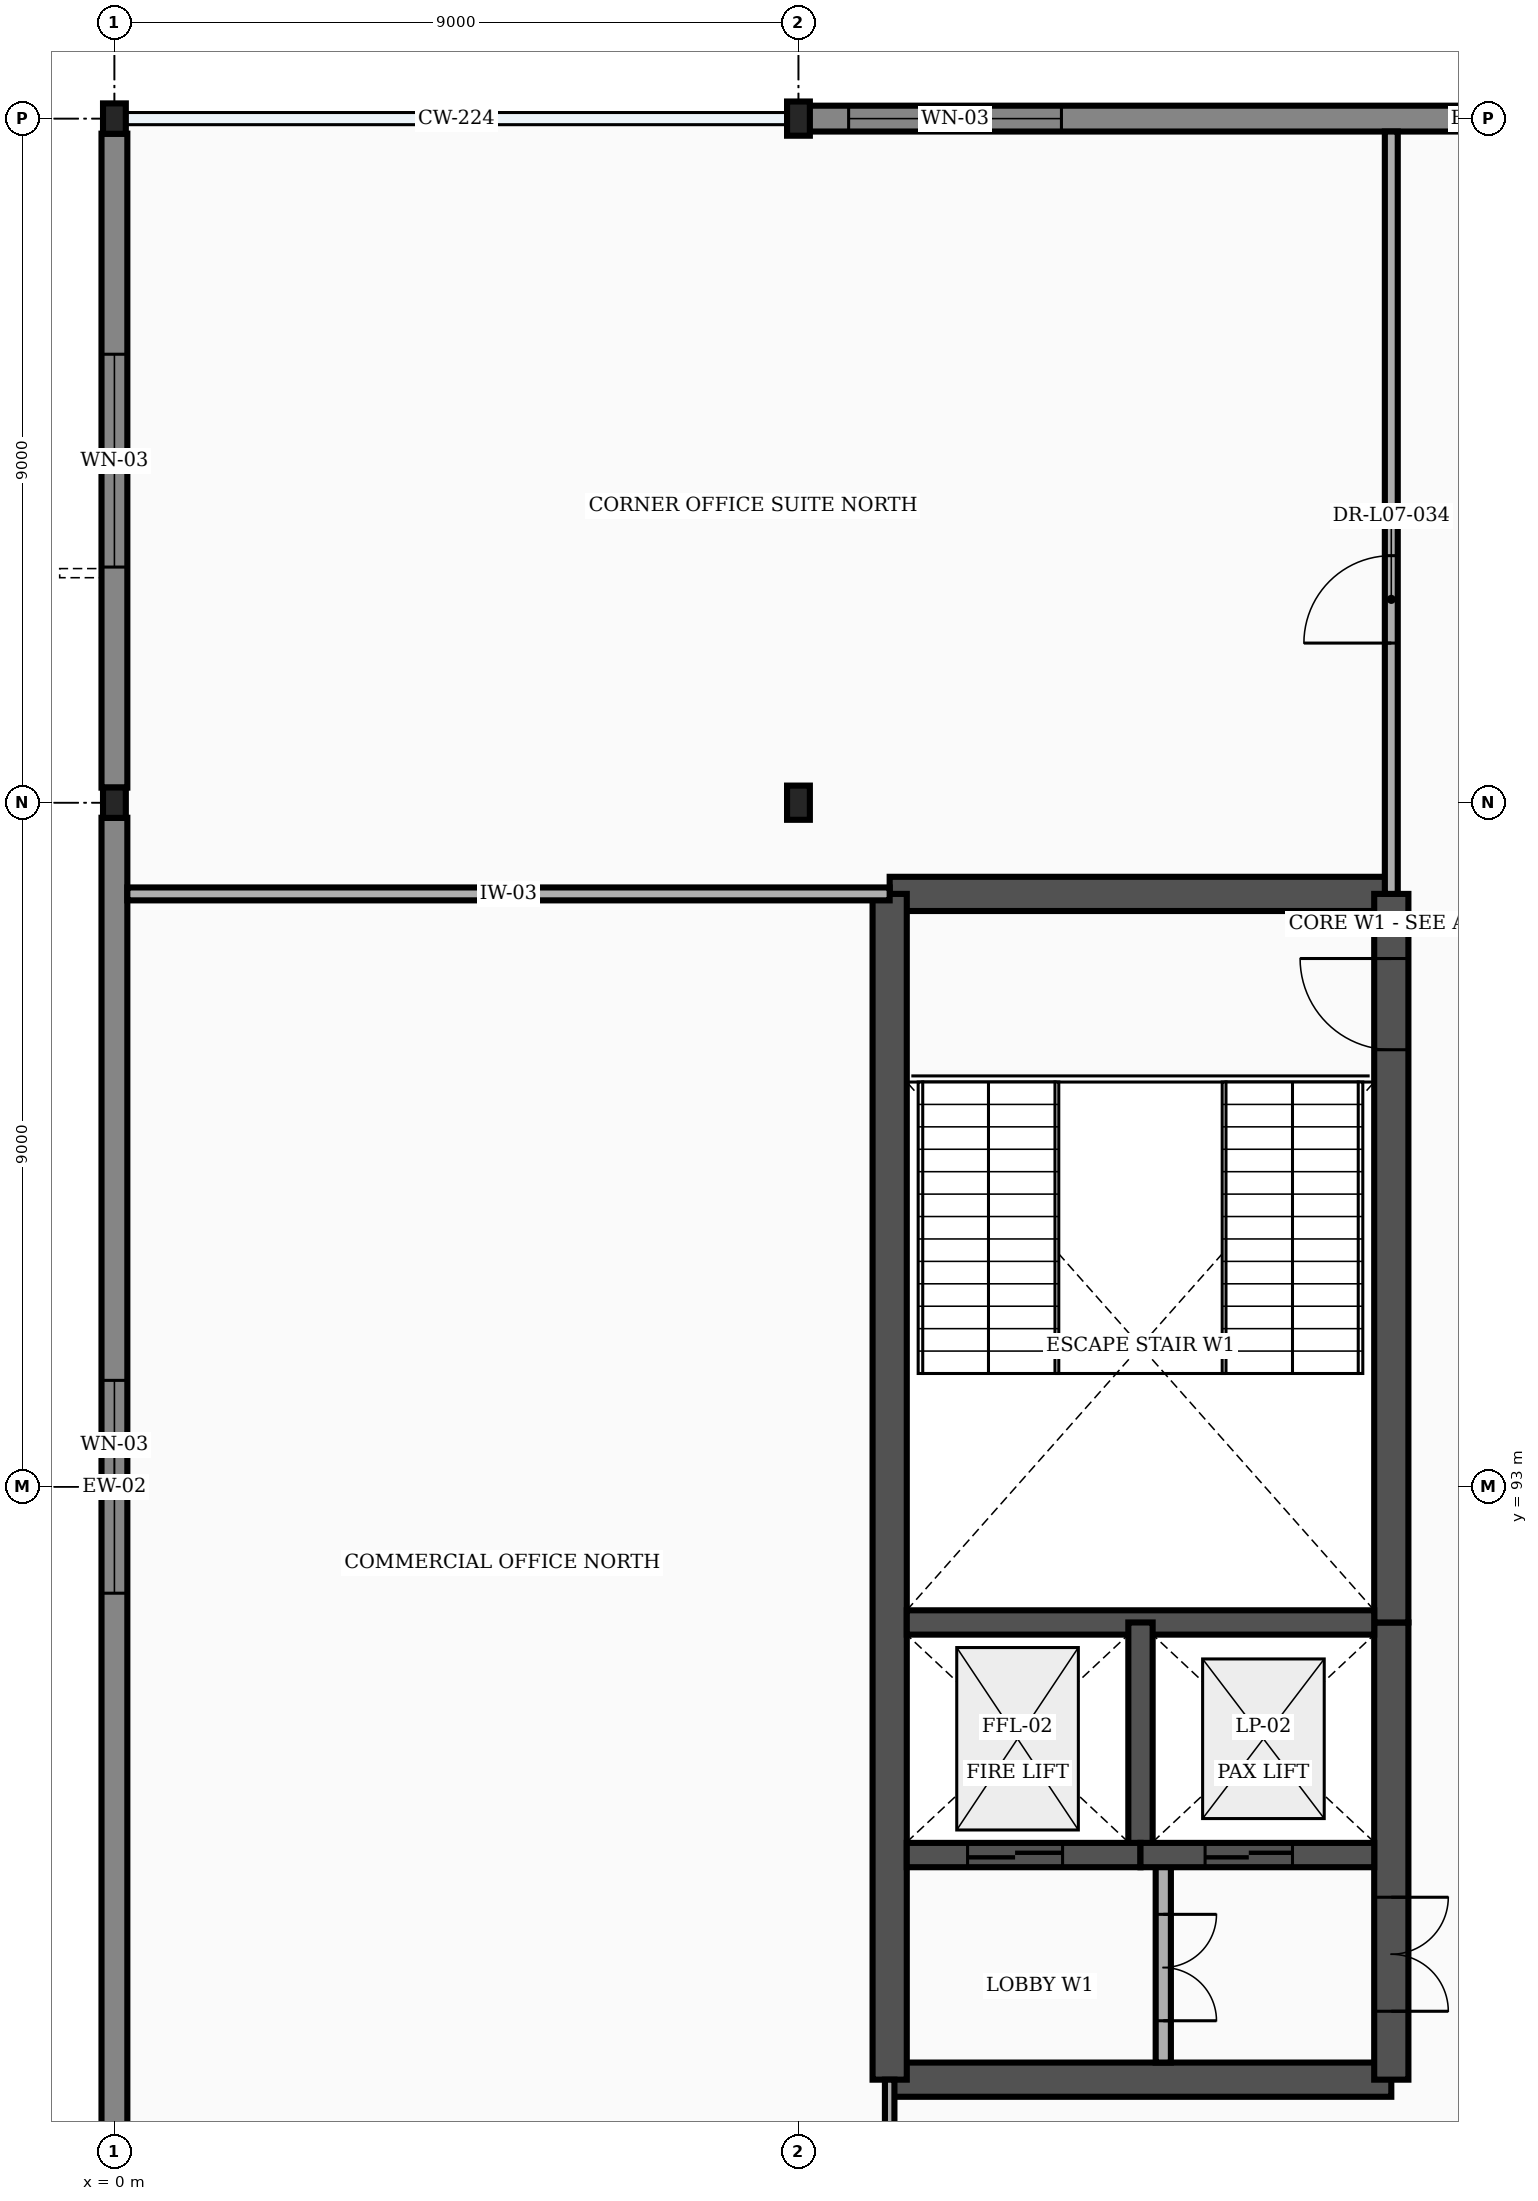
"""IFC4 building model, lengths in metres.
Left out: names, types, materials, properties, quantities, classifications, styles, units other than length and angle.
Written with IfcOpenShell. Run it as: python <this file> out.ifc"""

import sys

from ifc_helpers import new_model, si_unit, direction, frame, frame_2d, origin, origin_2d, place, context, subcontext, project, spatial, rectangle, i_section, extrude, element, fill, save


model = new_model("IFC4")
c1 = context("Model", 3, precision=1e-05, world=origin(), true_north=direction((0.0, 1.0)))
c2 = subcontext(c1, "Body", "Model", "MODEL_VIEW")
j1 = project(units=[si_unit("LENGTHUNIT", "METRE"), si_unit("PLANEANGLEUNIT", "RADIAN")], contexts=[c1])
p1 = place(None, origin())
s1 = spatial("IfcSite", under=j1, at=p1, CompositionType="ELEMENT")
p2 = place(p1, origin())
s2 = spatial("IfcBuilding", under=s1, at=p2, CompositionType="ELEMENT")
p3 = place(p2, frame((0.0, 0.0, 33.3)))
s3 = spatial("IfcBuildingStorey", under=s2, at=p3, CompositionType="ELEMENT", Elevation=33.3)
for number, where, z_axis, x_axis in (
    (1, (0.0, 102.0, 0.0), (0.0, 0.0, 1.0), (1.0, 0.0, 0.0)),
    (2, (0.0, 111.0, 0.0), (0.0, 0.0, 1.0), (1.0, 0.0, 0.0)),
):
    element("IfcColumn", number, at=place(p3, frame(where, z_axis=z_axis, x_axis=x_axis)), inside=s3, PredefinedType="COLUMN", context=c2, shape_type="SweptSolid", body=[
        extrude(i_section(OverallWidth=0.3, OverallDepth=0.4, WebThickness=0.013, FlangeThickness=0.024, FilletRadius=0.027, at=origin_2d()), origin(), (0.0, 0.0, 1.0), 4.5),
    ])
for number, where, z_axis, x_axis in (
    (3, (9.0, 102.0, 0.0), (0.0, 0.0, 1.0), (1.0, 0.0, 0.0)),
    (4, (9.0, 111.0, 0.0), (0.0, 0.0, 1.0), (1.0, 0.0, 0.0)),
):
    element("IfcColumn", number, at=place(p3, frame(where, z_axis=z_axis, x_axis=x_axis)), inside=s3, PredefinedType="COLUMN", context=c2, shape_type="SweptSolid", body=[
        extrude(i_section(OverallWidth=0.3, OverallDepth=0.45, WebThickness=0.014, FlangeThickness=0.026, FilletRadius=0.027, at=origin_2d()), origin(), (0.0, 0.0, 1.0), 4.5),
    ])
p4 = place(p3, frame((9.01, 111.0, 0.0), z_axis=(0.0, 0.0, 1.0), x_axis=(1.0, 0.0, 0.0)))
e5 = element("IfcWall", 5, at=p4, inside=s3, PredefinedType="STANDARD", context=c2, shape_type="SweptSolid", body=[
    extrude(rectangle(XDim=17.98, YDim=0.34, at=frame_2d((8.99, 0.0))), origin(), (0.0, 0.0, 1.0), 3.493),
])
p5 = place(p4, frame((0.65, 0.0, 0.85)))
e6 = element("IfcOpeningElement", 6, at=p5, cuts=e5, PredefinedType="OPENING", context=c2, shape_type="SweptSolid", body=[
    extrude(rectangle(XDim=2.8, YDim=2.25, at=frame_2d((1.4, 1.125))), frame((0.0, 0.182, 0.0), z_axis=(0.0, -1.0, 0.0), x_axis=(1.0, 0.0, 0.0)), (0.0, 0.0, 1.0), 0.364),
])
p6 = place(p3, frame((0.0, 84.198, 0.0), z_axis=(0.0, 0.0, 1.0), x_axis=(0.0, 1.0, 0.0)))
e7 = element("IfcWall", 7, at=p6, inside=s3, PredefinedType="STANDARD", context=c2, shape_type="SweptSolid", body=[
    extrude(rectangle(XDim=17.604, YDim=0.34, at=frame_2d((8.802, 0.0))), origin(), (0.0, 0.0, 1.0), 3.643),
])
p7 = place(p6, frame((7.402, 0.0, 0.85)))
e8 = element("IfcOpeningElement", 8, at=p7, cuts=e7, PredefinedType="OPENING", context=c2, shape_type="SweptSolid", body=[
    extrude(rectangle(XDim=2.8, YDim=2.25, at=frame_2d((1.4, 1.125))), frame((0.0, 0.182, 0.0), z_axis=(0.0, -1.0, 0.0), x_axis=(1.0, 0.0, 0.0)), (0.0, 0.0, 1.0), 0.364),
])
p8 = place(p3, frame((0.0, 102.198, 0.0), z_axis=(0.0, 0.0, 1.0), x_axis=(0.0, 1.0, 0.0)))
e9 = element("IfcWall", 9, at=p8, inside=s3, PredefinedType="STANDARD", context=c2, shape_type="SweptSolid", body=[
    extrude(rectangle(XDim=8.604, YDim=0.34, at=frame_2d((4.302, 0.0))), origin(), (0.0, 0.0, 1.0), 4.255),
])
p9 = place(p8, frame((2.902, 0.0, 0.85)))
e10 = element("IfcOpeningElement", 10, at=p9, cuts=e9, PredefinedType="OPENING", context=c2, shape_type="SweptSolid", body=[
    extrude(rectangle(XDim=2.8, YDim=2.25, at=frame_2d((1.4, 1.125))), frame((0.0, 0.182, 0.0), z_axis=(0.0, -1.0, 0.0), x_axis=(1.0, 0.0, 0.0)), (0.0, 0.0, 1.0), 0.364),
])
for number, where, z_axis, x_axis in (
    (11, (10.2, 85.2, 0.0), (0.0, 0.0, 1.0), (1.0, 0.0, 0.0)),
    (12, (10.2, 100.8, 0.0), (0.0, 0.0, 1.0), (1.0, 0.0, 0.0)),
):
    element("IfcWall", number, at=place(p3, frame(where, z_axis=z_axis, x_axis=x_axis)), inside=s3, PredefinedType="SHEAR", context=c2, shape_type="SweptSolid", body=[
        extrude(rectangle(XDim=6.6, YDim=0.45, at=frame_2d((3.3, 0.0))), origin(), (0.0, 0.0, 1.0), 4.255),
    ])
p10 = place(p3, frame((10.2, 85.2, 0.0), z_axis=(0.0, 0.0, 1.0), x_axis=(0.0, 1.0, 0.0)))
e13 = element("IfcWall", 13, at=p10, inside=s3, PredefinedType="SHEAR", context=c2, shape_type="SweptSolid", body=[
    extrude(rectangle(XDim=15.6, YDim=0.45, at=frame_2d((7.8, 0.0))), origin(), (0.0, 0.0, 1.0), 4.255),
])
p11 = place(p3, frame((16.8, 85.2, 0.0), z_axis=(0.0, 0.0, 1.0), x_axis=(0.0, 1.0, 0.0)))
e14 = element("IfcWall", 14, at=p11, inside=s3, PredefinedType="SHEAR", context=c2, shape_type="SweptSolid", body=[
    extrude(rectangle(XDim=6.015, YDim=0.45, at=frame_2d((3.008, 0.0))), origin(), (0.0, 0.0, 1.0), 4.255),
])
p12 = place(p11, frame((0.9, 0.0, 0.0)))
e15 = element("IfcOpeningElement", 15, at=p12, cuts=e14, PredefinedType="OPENING", context=c2, shape_type="SweptSolid", body=[
    extrude(rectangle(XDim=1.5, YDim=2.2, at=frame_2d((0.75, 1.1))), frame((0.0, 0.237, 0.0), z_axis=(0.0, -1.0, 0.0), x_axis=(1.0, 0.0, 0.0)), (0.0, 0.0, 1.0), 0.474),
])
p13 = place(p3, frame((16.8, 91.215, 0.0), z_axis=(0.0, 0.0, 1.0), x_axis=(0.0, 1.0, 0.0)))
e16 = element("IfcWall", 16, at=p13, inside=s3, PredefinedType="SHEAR", context=c2, shape_type="SweptSolid", body=[
    extrude(rectangle(XDim=9.585, YDim=0.45, at=frame_2d((4.792, 0.0))), origin(), (0.0, 0.0, 1.0), 4.255),
])
p14 = place(p13, frame((7.535, 0.0, 0.0)))
e17 = element("IfcOpeningElement", 17, at=p14, cuts=e16, PredefinedType="OPENING", context=c2, shape_type="SweptSolid", body=[
    extrude(rectangle(XDim=1.2, YDim=2.2, at=frame_2d((0.6, 1.1))), frame((0.0, 0.237, 0.0), z_axis=(0.0, -1.0, 0.0), x_axis=(1.0, 0.0, 0.0)), (0.0, 0.0, 1.0), 0.474),
])
p15 = place(p3, frame((10.425, 91.215, 0.0), z_axis=(0.0, 0.0, 1.0), x_axis=(1.0, 0.0, 0.0)))
e18 = element("IfcWall", 18, at=p15, inside=s3, PredefinedType="SHEAR", context=c2, shape_type="SweptSolid", body=[
    extrude(rectangle(XDim=6.15, YDim=0.32, at=frame_2d((3.075, 0.0))), origin(), (0.0, 0.0, 1.0), 4.255),
])
p16 = place(p3, frame((13.5, 88.155, 0.0), z_axis=(0.0, 0.0, 1.0), x_axis=(0.0, 1.0, 0.0)))
e19 = element("IfcWall", 19, at=p16, inside=s3, PredefinedType="SHEAR", context=c2, shape_type="SweptSolid", body=[
    extrude(rectangle(XDim=3.06, YDim=0.32, at=frame_2d((1.53, 0.0))), origin(), (0.0, 0.0, 1.0), 4.255),
])
p17 = place(p3, frame((13.8, 85.425, 0.0), z_axis=(0.0, 0.0, 1.0), x_axis=(0.0, 1.0, 0.0)))
e20 = element("IfcWall", 20, at=p17, inside=s3, PredefinedType="PARTITIONING", context=c2, shape_type="SweptSolid", body=[
    extrude(rectangle(XDim=2.73, YDim=0.2, at=frame_2d((1.365, 0.0))), origin(), (0.0, 0.0, 1.0), 4.255),
])
p18 = place(p17, frame((0.55, 0.0, 0.0)))
e21 = element("IfcOpeningElement", 21, at=p18, cuts=e20, PredefinedType="OPENING", context=c2, shape_type="SweptSolid", body=[
    extrude(rectangle(XDim=1.4, YDim=2.25, at=frame_2d((0.7, 1.125))), frame((0.0, 0.112, 0.0), z_axis=(0.0, -1.0, 0.0), x_axis=(1.0, 0.0, 0.0)), (0.0, 0.0, 1.0), 0.224),
])
p19 = place(p3, frame((10.425, 88.155, 0.0), z_axis=(0.0, 0.0, 1.0), x_axis=(1.0, 0.0, 0.0)))
e22 = element("IfcWall", 22, at=p19, inside=s3, PredefinedType="SHEAR", context=c2, shape_type="SweptSolid", body=[
    extrude(rectangle(XDim=3.075, YDim=0.32, at=frame_2d((1.538, 0.0))), origin(), (0.0, 0.0, 1.0), 4.255),
])
p20 = place(p19, frame((0.8, 0.0, 0.0)))
e23 = element("IfcOpeningElement", 23, at=p20, cuts=e22, PredefinedType="OPENING", context=c2, shape_type="SweptSolid", body=[
    extrude(rectangle(XDim=1.25, YDim=2.25, at=frame_2d((0.625, 1.125))), frame((0.0, 0.172, 0.0), z_axis=(0.0, -1.0, 0.0), x_axis=(1.0, 0.0, 0.0)), (0.0, 0.0, 1.0), 0.344),
])
p21 = place(p3, frame((13.5, 88.155, 0.0), z_axis=(0.0, 0.0, 1.0), x_axis=(1.0, 0.0, 0.0)))
e24 = element("IfcWall", 24, at=p21, inside=s3, PredefinedType="SHEAR", context=c2, shape_type="SweptSolid", body=[
    extrude(rectangle(XDim=3.075, YDim=0.32, at=frame_2d((1.538, 0.0))), origin(), (0.0, 0.0, 1.0), 4.255),
])
p22 = place(p21, frame((0.85, 0.0, 0.0)))
e25 = element("IfcOpeningElement", 25, at=p22, cuts=e24, PredefinedType="OPENING", context=c2, shape_type="SweptSolid", body=[
    extrude(rectangle(XDim=1.15, YDim=2.2, at=frame_2d((0.575, 1.1))), frame((0.0, 0.172, 0.0), z_axis=(0.0, -1.0, 0.0), x_axis=(1.0, 0.0, 0.0)), (0.0, 0.0, 1.0), 0.344),
])
p23 = place(p3, frame((10.2, 83.2, 0.0), z_axis=(0.0, 0.0, 1.0), x_axis=(0.0, 1.0, 0.0)))
e26 = element("IfcWall", 26, at=p23, inside=s3, PredefinedType="PARTITIONING", context=c2, shape_type="SweptSolid", body=[
    extrude(rectangle(XDim=2.0, YDim=0.125, at=frame_2d((1.0, 0.0))), origin(), (0.0, 0.0, 1.0), 4.255),
])
p24 = place(p3, frame((0.17, 100.8, 0.0), z_axis=(0.0, 0.0, 1.0), x_axis=(1.0, 0.0, 0.0)))
e27 = element("IfcWall", 27, at=p24, inside=s3, PredefinedType="PARTITIONING", context=c2, shape_type="SweptSolid", body=[
    extrude(rectangle(XDim=10.03, YDim=0.17, at=frame_2d((5.015, 0.0))), origin(), (0.0, 0.0, 1.0), 4.255),
])
p25 = place(p3, frame((16.8, 100.8, 0.0), z_axis=(0.0, 0.0, 1.0), x_axis=(0.0, 1.0, 0.0)))
e28 = element("IfcWall", 28, at=p25, inside=s3, PredefinedType="PARTITIONING", context=c2, shape_type="SweptSolid", body=[
    extrude(rectangle(XDim=10.03, YDim=0.17, at=frame_2d((5.015, 0.0))), origin(), (0.0, 0.0, 1.0), 4.255),
])
p26 = place(p25, frame((3.3, 0.0, 0.0)))
e29 = element("IfcOpeningElement", 29, at=p26, cuts=e28, PredefinedType="OPENING", context=c2, shape_type="SweptSolid", body=[
    extrude(rectangle(XDim=1.15, YDim=2.15, at=frame_2d((0.575, 1.075))), frame((0.0, 0.097, 0.0), z_axis=(0.0, -1.0, 0.0), x_axis=(1.0, 0.0, 0.0)), (0.0, 0.0, 1.0), 0.194),
])
p27 = place(p5, origin())
e30 = element("IfcWindow", 30, at=p27, inside=s3, PartitioningType="SINGLE_PANEL", PredefinedType="WINDOW", context=c2, shape_type="SweptSolid", body=[
    extrude(rectangle(XDim=2.8, YDim=2.25, at=frame_2d((1.4, 1.125))), frame((0.0, 0.03, 0.0), z_axis=(0.0, -1.0, 0.0), x_axis=(1.0, 0.0, 0.0)), (0.0, 0.0, 1.0), 0.06),
])
fill(e6, e30)
p28 = place(p7, origin())
e31 = element("IfcWindow", 31, at=p28, inside=s3, PartitioningType="SINGLE_PANEL", PredefinedType="WINDOW", context=c2, shape_type="SweptSolid", body=[
    extrude(rectangle(XDim=2.8, YDim=2.25, at=frame_2d((1.4, 1.125))), frame((0.0, 0.03, 0.0), z_axis=(0.0, -1.0, 0.0), x_axis=(1.0, 0.0, 0.0)), (0.0, 0.0, 1.0), 0.06),
])
fill(e8, e31)
p29 = place(p9, origin())
e32 = element("IfcWindow", 32, at=p29, inside=s3, PartitioningType="SINGLE_PANEL", PredefinedType="WINDOW", context=c2, shape_type="SweptSolid", body=[
    extrude(rectangle(XDim=2.8, YDim=2.25, at=frame_2d((1.4, 1.125))), frame((0.0, 0.03, 0.0), z_axis=(0.0, -1.0, 0.0), x_axis=(1.0, 0.0, 0.0)), (0.0, 0.0, 1.0), 0.06),
])
fill(e10, e32)
p30 = place(p12, frame((1.5, 0.0, 0.0), z_axis=(0.0, 0.0, 1.0), x_axis=(-1.0, 0.0, 0.0)))
e33 = element("IfcDoor", 33, at=p30, inside=s3, OperationType="DOUBLE_DOOR_SINGLE_SWING", PredefinedType="DOOR", context=c2, shape_type="SweptSolid", body=[
    extrude(rectangle(XDim=1.5, YDim=2.2, at=frame_2d((0.75, 1.1))), frame((0.0, 0.025, 0.0), z_axis=(0.0, -1.0, 0.0), x_axis=(1.0, 0.0, 0.0)), (0.0, 0.0, 1.0), 0.05),
])
fill(e15, e33)
p31 = place(p14, origin())
e34 = element("IfcDoor", 34, at=p31, inside=s3, OperationType="SINGLE_SWING_RIGHT", PredefinedType="DOOR", context=c2, shape_type="SweptSolid", body=[
    extrude(rectangle(XDim=1.2, YDim=2.2, at=frame_2d((0.6, 1.1))), frame((0.0, 0.025, 0.0), z_axis=(0.0, -1.0, 0.0), x_axis=(1.0, 0.0, 0.0)), (0.0, 0.0, 1.0), 0.05),
])
fill(e17, e34)
p32 = place(p18, frame((1.4, 0.0, 0.0), z_axis=(0.0, 0.0, 1.0), x_axis=(-1.0, 0.0, 0.0)))
e35 = element("IfcDoor", 35, at=p32, inside=s3, OperationType="DOUBLE_DOOR_SINGLE_SWING", PredefinedType="DOOR", context=c2, shape_type="SweptSolid", body=[
    extrude(rectangle(XDim=1.4, YDim=2.25, at=frame_2d((0.7, 1.125))), frame((0.0, 0.025, 0.0), z_axis=(0.0, -1.0, 0.0), x_axis=(1.0, 0.0, 0.0)), (0.0, 0.0, 1.0), 0.05),
])
fill(e21, e35)
p33 = place(p20, origin())
e36 = element("IfcDoor", 36, at=p33, inside=s3, OperationType="DOUBLE_DOOR_SLIDING", PredefinedType="DOOR", context=c2, shape_type="SweptSolid", body=[
    extrude(rectangle(XDim=1.25, YDim=2.25, at=frame_2d((0.625, 1.125))), frame((0.0, 0.025, 0.0), z_axis=(0.0, -1.0, 0.0), x_axis=(1.0, 0.0, 0.0)), (0.0, 0.0, 1.0), 0.05),
])
fill(e23, e36)
p34 = place(p22, origin())
e37 = element("IfcDoor", 37, at=p34, inside=s3, OperationType="DOUBLE_DOOR_SLIDING", PredefinedType="DOOR", context=c2, shape_type="SweptSolid", body=[
    extrude(rectangle(XDim=1.15, YDim=2.2, at=frame_2d((0.575, 1.1))), frame((0.0, 0.025, 0.0), z_axis=(0.0, -1.0, 0.0), x_axis=(1.0, 0.0, 0.0)), (0.0, 0.0, 1.0), 0.05),
])
fill(e25, e37)
p35 = place(p26, origin())
e38 = element("IfcDoor", 38, at=p35, inside=s3, OperationType="SINGLE_SWING_LEFT", PredefinedType="DOOR", context=c2, shape_type="SweptSolid", body=[
    extrude(rectangle(XDim=1.15, YDim=2.15, at=frame_2d((0.575, 1.075))), frame((0.0, 0.025, 0.0), z_axis=(0.0, -1.0, 0.0), x_axis=(1.0, 0.0, 0.0)), (0.0, 0.0, 1.0), 0.05),
])
fill(e29, e38)
save(model, sys.argv[1])
